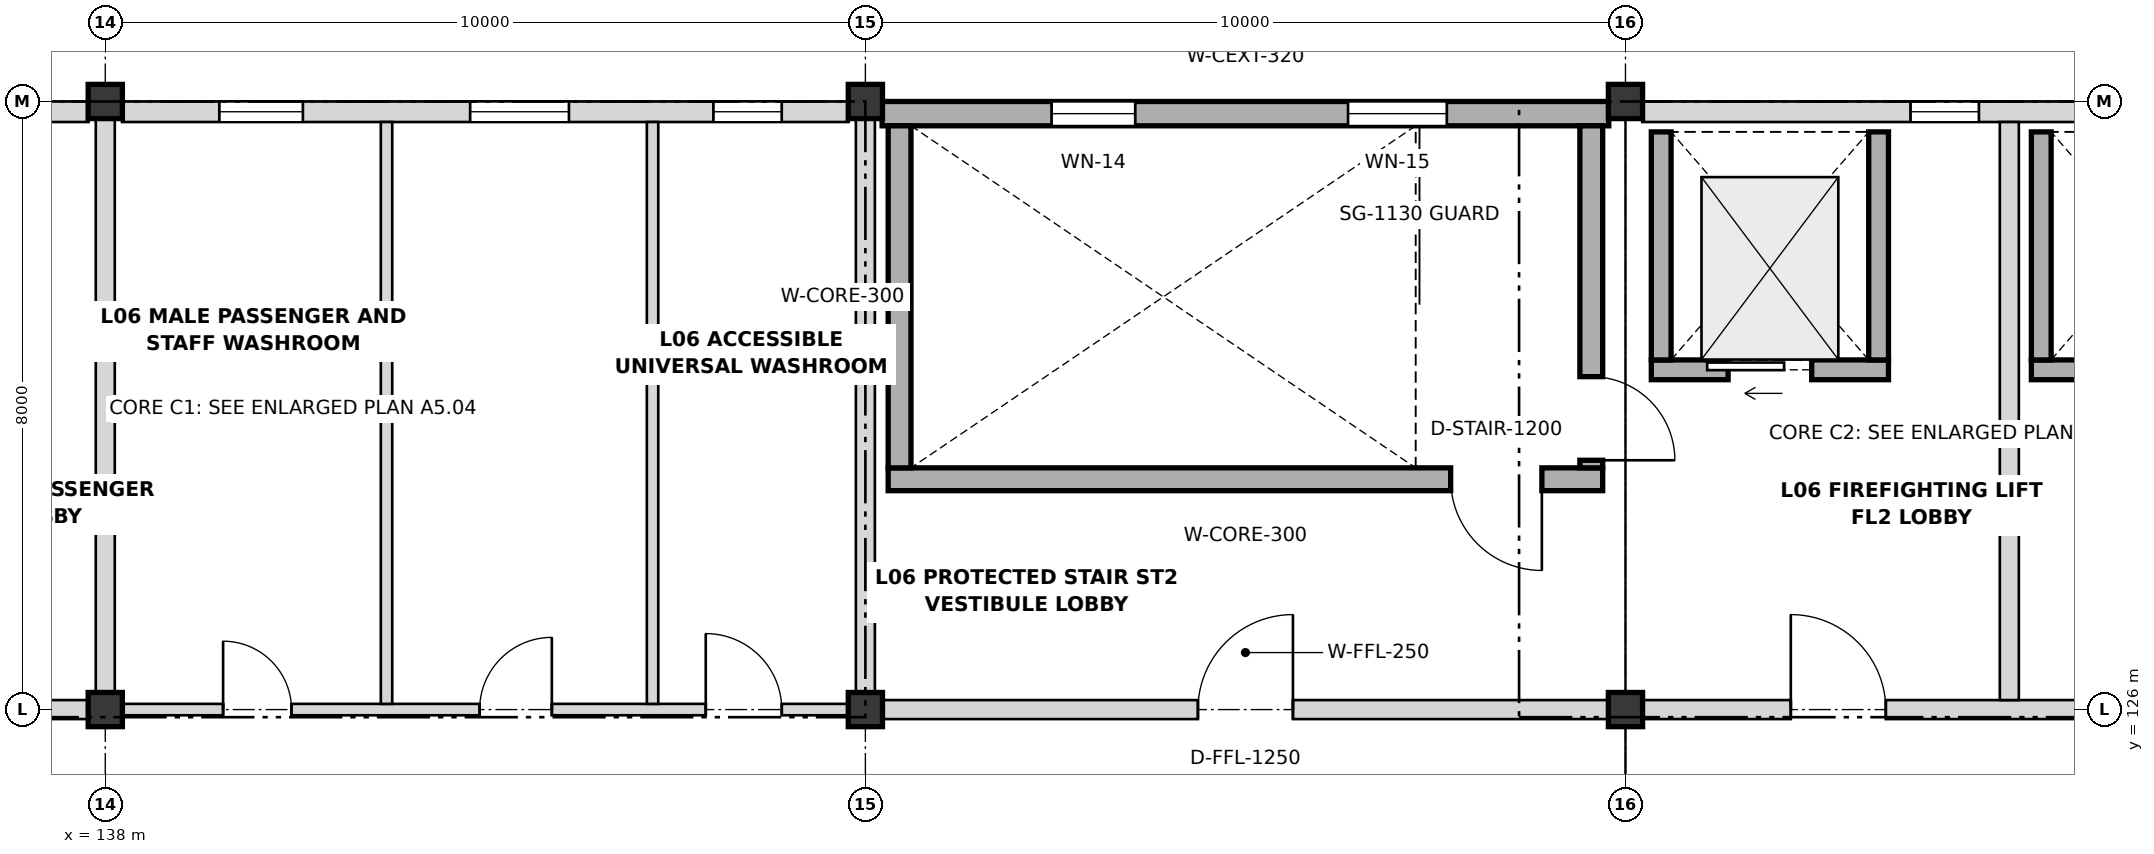
"""IFC4 building model, lengths in metres.
Left out: names, types, materials, properties, quantities, classifications, styles, units other than length and angle.
Written with IfcOpenShell. Run it as: python <this file> out.ifc"""

import sys

from ifc_helpers import new_model, si_unit, direction, frame, frame_2d, origin, origin_2d, place, context, subcontext, project, spatial, rectangle, extrude, element, fill, save


model = new_model("IFC4")
c1 = context("Model", 3, precision=1e-05, world=origin(), true_north=direction((0.0, 1.0)))
c2 = subcontext(c1, "Body", "Model", "MODEL_VIEW")
j1 = project(units=[si_unit("LENGTHUNIT", "METRE"), si_unit("PLANEANGLEUNIT", "RADIAN")], contexts=[c1])
p1 = place(None, origin())
s1 = spatial("IfcSite", under=j1, at=p1, CompositionType="ELEMENT")
p2 = place(p1, origin())
s2 = spatial("IfcBuilding", under=s1, at=p2, CompositionType="ELEMENT")
p3 = place(p2, frame((0.0, 0.0, 27.0)))
s3 = spatial("IfcBuildingStorey", under=s2, at=p3, CompositionType="ELEMENT", Elevation=27.0)
for number, where, z_axis, x_axis in (
    (1, (138.0, 126.0, 0.0), (0.0, 0.0, 1.0), (1.0, 0.0, 0.0)),
    (2, (138.0, 134.0, 0.0), (0.0, 0.0, 1.0), (1.0, 0.0, 0.0)),
    (3, (148.0, 126.0, 0.0), (0.0, 0.0, 1.0), (1.0, 0.0, 0.0)),
    (4, (148.0, 134.0, 0.0), (0.0, 0.0, 1.0), (1.0, 0.0, 0.0)),
    (5, (158.0, 126.0, 0.0), (0.0, 0.0, 1.0), (1.0, 0.0, 0.0)),
    (6, (158.0, 134.0, 0.0), (0.0, 0.0, 1.0), (1.0, 0.0, 0.0)),
):
    element("IfcColumn", number, at=place(p3, frame(where, z_axis=z_axis, x_axis=x_axis)), inside=s3, PredefinedType="COLUMN", context=c2, shape_type="SweptSolid", body=[
        extrude(rectangle(XDim=0.45, YDim=0.45, at=origin_2d()), origin(), (0.0, 0.0, 1.0), 4.2),
    ])
p4 = place(p3, frame((128.22, 133.865, 0.0), z_axis=(0.0, 0.0, 1.0), x_axis=(1.0, 0.0, 0.0)))
e7 = element("IfcWall", 7, at=p4, inside=s3, PredefinedType="SOLIDWALL", context=c2, shape_type="SweptSolid", body=[
    extrude(rectangle(XDim=9.56, YDim=0.27, at=frame_2d((4.78, 0.0))), origin(), (0.0, 0.0, 1.0), 3.218),
])
p5 = place(p4, frame((3.53, 0.0, 1.05)))
e8 = element("IfcOpeningElement", 8, at=p5, cuts=e7, PredefinedType="OPENING", context=c2, shape_type="SweptSolid", body=[
    extrude(rectangle(XDim=0.9, YDim=1.15, at=frame_2d((0.45, 0.575))), frame((0.0, 0.145, 0.0), z_axis=(0.0, -1.0, 0.0), x_axis=(1.0, 0.0, 0.0)), (0.0, 0.0, 1.0), 0.29),
])
p6 = place(p3, frame((138.22, 133.865, 0.0), z_axis=(0.0, 0.0, 1.0), x_axis=(1.0, 0.0, 0.0)))
e9 = element("IfcWall", 9, at=p6, inside=s3, PredefinedType="SOLIDWALL", context=c2, shape_type="SweptSolid", body=[
    extrude(rectangle(XDim=9.56, YDim=0.27, at=frame_2d((4.78, 0.0))), origin(), (0.0, 0.0, 1.0), 3.218),
])
p7 = place(p6, frame((1.28, 0.0, 1.25)))
e10 = element("IfcOpeningElement", 10, at=p7, cuts=e9, PredefinedType="OPENING", context=c2, shape_type="SweptSolid", body=[
    extrude(rectangle(XDim=1.1, YDim=1.15, at=frame_2d((0.55, 0.575))), frame((0.0, 0.145, 0.0), z_axis=(0.0, -1.0, 0.0), x_axis=(1.0, 0.0, 0.0)), (0.0, 0.0, 1.0), 0.29),
])
p8 = place(p6, frame((4.58, 0.0, 1.25)))
e11 = element("IfcOpeningElement", 11, at=p8, cuts=e9, PredefinedType="OPENING", context=c2, shape_type="SweptSolid", body=[
    extrude(rectangle(XDim=1.3, YDim=1.15, at=frame_2d((0.65, 0.575))), frame((0.0, 0.145, 0.0), z_axis=(0.0, -1.0, 0.0), x_axis=(1.0, 0.0, 0.0)), (0.0, 0.0, 1.0), 0.29),
])
p9 = place(p6, frame((7.78, 0.0, 1.25)))
e12 = element("IfcOpeningElement", 12, at=p9, cuts=e9, PredefinedType="OPENING", context=c2, shape_type="SweptSolid", body=[
    extrude(rectangle(XDim=0.9, YDim=1.4, at=frame_2d((0.45, 0.7))), frame((0.0, 0.145, 0.0), z_axis=(0.0, -1.0, 0.0), x_axis=(1.0, 0.0, 0.0)), (0.0, 0.0, 1.0), 0.29),
])
p10 = place(p3, frame((148.22, 133.84, 0.0), z_axis=(0.0, 0.0, 1.0), x_axis=(1.0, 0.0, 0.0)))
e13 = element("IfcWall", 13, at=p10, inside=s3, PredefinedType="SHEAR", context=c2, shape_type="SweptSolid", body=[
    extrude(rectangle(XDim=9.56, YDim=0.32, at=frame_2d((4.78, 0.0))), origin(), (0.0, 0.0, 1.0), 4.2),
])
p11 = place(p10, frame((2.23, 0.0, 1.05)))
e14 = element("IfcOpeningElement", 14, at=p11, cuts=e13, PredefinedType="OPENING", context=c2, shape_type="SweptSolid", body=[
    extrude(rectangle(XDim=1.1, YDim=1.4, at=frame_2d((0.55, 0.7))), frame((0.0, 0.17, 0.0), z_axis=(0.0, -1.0, 0.0), x_axis=(1.0, 0.0, 0.0)), (0.0, 0.0, 1.0), 0.34),
])
p12 = place(p10, frame((6.13, 0.0, 1.05)))
e15 = element("IfcOpeningElement", 15, at=p12, cuts=e13, PredefinedType="OPENING", context=c2, shape_type="SweptSolid", body=[
    extrude(rectangle(XDim=1.3, YDim=1.4, at=frame_2d((0.65, 0.7))), frame((0.0, 0.17, 0.0), z_axis=(0.0, -1.0, 0.0), x_axis=(1.0, 0.0, 0.0)), (0.0, 0.0, 1.0), 0.34),
])
p13 = place(p3, frame((158.22, 133.865, 0.0), z_axis=(0.0, 0.0, 1.0), x_axis=(1.0, 0.0, 0.0)))
e16 = element("IfcWall", 16, at=p13, inside=s3, PredefinedType="SOLIDWALL", context=c2, shape_type="SweptSolid", body=[
    extrude(rectangle(XDim=9.56, YDim=0.27, at=frame_2d((4.78, 0.0))), origin(), (0.0, 0.0, 1.0), 3.218),
])
p14 = place(p13, frame((3.53, 0.0, 1.05)))
e17 = element("IfcOpeningElement", 17, at=p14, cuts=e16, PredefinedType="OPENING", context=c2, shape_type="SweptSolid", body=[
    extrude(rectangle(XDim=0.9, YDim=1.15, at=frame_2d((0.45, 0.575))), frame((0.0, 0.145, 0.0), z_axis=(0.0, -1.0, 0.0), x_axis=(1.0, 0.0, 0.0)), (0.0, 0.0, 1.0), 0.29),
])
p15 = place(p3, frame((157.7, 129.03, 0.0), z_axis=(0.0, 0.0, 1.0), x_axis=(-1.0, 0.0, 0.0)))
e18 = element("IfcWall", 18, at=p15, inside=s3, PredefinedType="SHEAR", context=c2, shape_type="SweptSolid", body=[
    extrude(rectangle(XDim=9.4, YDim=0.3, at=frame_2d((4.7, 0.0))), origin(), (0.0, 0.0, 1.0), 3.98),
])
p16 = place(p15, frame((0.8, 0.0, 0.0)))
e19 = element("IfcOpeningElement", 19, at=p16, cuts=e18, PredefinedType="OPENING", context=c2, shape_type="SweptSolid", body=[
    extrude(rectangle(XDim=1.2, YDim=2.15, at=frame_2d((0.6, 1.075))), frame((0.0, 0.16, 0.0), z_axis=(0.0, -1.0, 0.0), x_axis=(1.0, 0.0, 0.0)), (0.0, 0.0, 1.0), 0.32),
])
p17 = place(p3, frame((157.55, 133.68, 0.0), z_axis=(0.0, 0.0, 1.0), x_axis=(0.0, -1.0, 0.0)))
e20 = element("IfcWall", 20, at=p17, inside=s3, PredefinedType="SHEAR", context=c2, shape_type="SweptSolid", body=[
    extrude(rectangle(XDim=4.5, YDim=0.3, at=frame_2d((2.25, 0.0))), origin(), (0.0, 0.0, 1.0), 3.98),
])
p18 = place(p17, frame((3.3, 0.0, 0.0)))
e21 = element("IfcOpeningElement", 21, at=p18, cuts=e20, PredefinedType="OPENING", context=c2, shape_type="SweptSolid", body=[
    extrude(rectangle(XDim=1.1, YDim=2.15, at=frame_2d((0.55, 1.075))), frame((0.0, 0.16, 0.0), z_axis=(0.0, -1.0, 0.0), x_axis=(1.0, 0.0, 0.0)), (0.0, 0.0, 1.0), 0.32),
])
p19 = place(p3, frame((148.45, 129.18, 0.0), z_axis=(0.0, 0.0, 1.0), x_axis=(0.0, 1.0, 0.0)))
e22 = element("IfcWall", 22, at=p19, inside=s3, PredefinedType="SHEAR", context=c2, shape_type="SweptSolid", body=[
    extrude(rectangle(XDim=4.5, YDim=0.3, at=frame_2d((2.25, 0.0))), origin(), (0.0, 0.0, 1.0), 3.98),
])
p20 = place(p3, frame((158.34, 130.47, 0.0), z_axis=(0.0, 0.0, 1.0), x_axis=(1.0, 0.0, 0.0)))
e23 = element("IfcWall", 23, at=p20, inside=s3, PredefinedType="SHEAR", context=c2, shape_type="SweptSolid", body=[
    extrude(rectangle(XDim=3.12, YDim=0.26, at=frame_2d((1.56, 0.0))), origin(), (0.0, 0.0, 1.0), 3.98),
])
p21 = place(p20, frame((1.01, 0.0, 0.0)))
e24 = element("IfcOpeningElement", 24, at=p21, cuts=e23, PredefinedType="OPENING", context=c2, shape_type="SweptSolid", body=[
    extrude(rectangle(XDim=1.1, YDim=2.1, at=frame_2d((0.55, 1.05))), frame((0.0, 0.14, 0.0), z_axis=(0.0, -1.0, 0.0), x_axis=(1.0, 0.0, 0.0)), (0.0, 0.0, 1.0), 0.28),
])
for number, where, z_axis, x_axis in (
    (25, (158.47, 130.6, 0.0), (0.0, 0.0, 1.0), (0.0, 1.0, 0.0)),
    (26, (161.33, 130.6, 0.0), (0.0, 0.0, 1.0), (0.0, 1.0, 0.0)),
):
    element("IfcWall", number, at=place(p3, frame(where, z_axis=z_axis, x_axis=x_axis)), inside=s3, PredefinedType="SHEAR", context=c2, shape_type="SweptSolid", body=[
        extrude(rectangle(XDim=3.0, YDim=0.26, at=frame_2d((1.5, 0.0))), origin(), (0.0, 0.0, 1.0), 3.98),
    ])
p22 = place(p3, frame((163.34, 130.47, 0.0), z_axis=(0.0, 0.0, 1.0), x_axis=(1.0, 0.0, 0.0)))
e27 = element("IfcWall", 27, at=p22, inside=s3, PredefinedType="SHEAR", context=c2, shape_type="SweptSolid", body=[
    extrude(rectangle(XDim=3.12, YDim=0.26, at=frame_2d((1.56, 0.0))), origin(), (0.0, 0.0, 1.0), 3.98),
])
p23 = place(p22, frame((1.01, 0.0, 0.0)))
e28 = element("IfcOpeningElement", 28, at=p23, cuts=e27, PredefinedType="OPENING", context=c2, shape_type="SweptSolid", body=[
    extrude(rectangle(XDim=1.1, YDim=2.15, at=frame_2d((0.55, 1.075))), frame((0.0, 0.14, 0.0), z_axis=(0.0, -1.0, 0.0), x_axis=(1.0, 0.0, 0.0)), (0.0, 0.0, 1.0), 0.28),
])
p24 = place(p3, frame((163.47, 130.6, 0.0), z_axis=(0.0, 0.0, 1.0), x_axis=(0.0, 1.0, 0.0)))
e29 = element("IfcWall", 29, at=p24, inside=s3, PredefinedType="SHEAR", context=c2, shape_type="SweptSolid", body=[
    extrude(rectangle(XDim=3.0, YDim=0.26, at=frame_2d((1.5, 0.0))), origin(), (0.0, 0.0, 1.0), 3.98),
])
p25 = place(p3, frame((128.23, 126.0, 0.0), z_axis=(0.0, 0.0, 1.0), x_axis=(1.0, 0.0, 0.0)))
e30 = element("IfcWall", 30, at=p25, inside=s3, PredefinedType="PARTITIONING", context=c2, shape_type="SweptSolid", body=[
    extrude(rectangle(XDim=9.54, YDim=0.25, at=frame_2d((4.77, 0.0))), origin(), (0.0, 0.0, 1.0), 3.218),
])
p26 = place(p25, frame((1.945, 0.0, 0.0)))
e31 = element("IfcOpeningElement", 31, at=p26, cuts=e30, PredefinedType="OPENING", context=c2, shape_type="SweptSolid", body=[
    extrude(rectangle(XDim=1.25, YDim=2.15, at=frame_2d((0.625, 1.075))), frame((0.0, 0.135, 0.0), z_axis=(0.0, -1.0, 0.0), x_axis=(1.0, 0.0, 0.0)), (0.0, 0.0, 1.0), 0.27),
])
p27 = place(p25, frame((6.42, 0.0, 0.0)))
e32 = element("IfcOpeningElement", 32, at=p27, cuts=e30, PredefinedType="OPENING", context=c2, shape_type="SweptSolid", body=[
    extrude(rectangle(XDim=1.1, YDim=2.15, at=frame_2d((0.55, 1.075))), frame((0.0, 0.135, 0.0), z_axis=(0.0, -1.0, 0.0), x_axis=(1.0, 0.0, 0.0)), (0.0, 0.0, 1.0), 0.27),
])
p28 = place(p3, frame((138.23, 126.0, 0.0), z_axis=(0.0, 0.0, 1.0), x_axis=(1.0, 0.0, 0.0)))
e33 = element("IfcWall", 33, at=p28, inside=s3, PredefinedType="PARTITIONING", context=c2, shape_type="SweptSolid", body=[
    extrude(rectangle(XDim=9.54, YDim=0.15, at=frame_2d((4.77, 0.0))), origin(), (0.0, 0.0, 1.0), 3.218),
])
p29 = place(p28, frame((1.32, 0.0, 0.0)))
e34 = element("IfcOpeningElement", 34, at=p29, cuts=e33, PredefinedType="OPENING", context=c2, shape_type="SweptSolid", body=[
    extrude(rectangle(XDim=0.9, YDim=2.05, at=frame_2d((0.45, 1.025))), frame((0.0, 0.085, 0.0), z_axis=(0.0, -1.0, 0.0), x_axis=(1.0, 0.0, 0.0)), (0.0, 0.0, 1.0), 0.17),
])
p30 = place(p28, frame((4.695, 0.0, 0.0)))
e35 = element("IfcOpeningElement", 35, at=p30, cuts=e33, PredefinedType="OPENING", context=c2, shape_type="SweptSolid", body=[
    extrude(rectangle(XDim=0.95, YDim=2.05, at=frame_2d((0.475, 1.025))), frame((0.0, 0.085, 0.0), z_axis=(0.0, -1.0, 0.0), x_axis=(1.0, 0.0, 0.0)), (0.0, 0.0, 1.0), 0.17),
])
p31 = place(p28, frame((7.67, 0.0, 0.0)))
e36 = element("IfcOpeningElement", 36, at=p31, cuts=e33, PredefinedType="OPENING", context=c2, shape_type="SweptSolid", body=[
    extrude(rectangle(XDim=1.0, YDim=2.05, at=frame_2d((0.5, 1.025))), frame((0.0, 0.085, 0.0), z_axis=(0.0, -1.0, 0.0), x_axis=(1.0, 0.0, 0.0)), (0.0, 0.0, 1.0), 0.17),
])
p32 = place(p3, frame((148.23, 126.0, 0.0), z_axis=(0.0, 0.0, 1.0), x_axis=(1.0, 0.0, 0.0)))
e37 = element("IfcWall", 37, at=p32, inside=s3, PredefinedType="PARTITIONING", context=c2, shape_type="SweptSolid", body=[
    extrude(rectangle(XDim=9.54, YDim=0.25, at=frame_2d((4.77, 0.0))), origin(), (0.0, 0.0, 1.0), 3.218),
])
p33 = place(p32, frame((4.145, 0.0, 0.0)))
e38 = element("IfcOpeningElement", 38, at=p33, cuts=e37, PredefinedType="OPENING", context=c2, shape_type="SweptSolid", body=[
    extrude(rectangle(XDim=1.25, YDim=2.15, at=frame_2d((0.625, 1.075))), frame((0.0, 0.135, 0.0), z_axis=(0.0, -1.0, 0.0), x_axis=(1.0, 0.0, 0.0)), (0.0, 0.0, 1.0), 0.27),
])
p34 = place(p3, frame((158.23, 126.0, 0.0), z_axis=(0.0, 0.0, 1.0), x_axis=(1.0, 0.0, 0.0)))
e39 = element("IfcWall", 39, at=p34, inside=s3, PredefinedType="PARTITIONING", context=c2, shape_type="SweptSolid", body=[
    extrude(rectangle(XDim=9.54, YDim=0.25, at=frame_2d((4.77, 0.0))), origin(), (0.0, 0.0, 1.0), 3.218),
])
p35 = place(p34, frame((1.945, 0.0, 0.0)))
e40 = element("IfcOpeningElement", 40, at=p35, cuts=e39, PredefinedType="OPENING", context=c2, shape_type="SweptSolid", body=[
    extrude(rectangle(XDim=1.25, YDim=2.15, at=frame_2d((0.625, 1.075))), frame((0.0, 0.135, 0.0), z_axis=(0.0, -1.0, 0.0), x_axis=(1.0, 0.0, 0.0)), (0.0, 0.0, 1.0), 0.27),
])
p36 = place(p34, frame((6.42, 0.0, 0.0)))
e41 = element("IfcOpeningElement", 41, at=p36, cuts=e39, PredefinedType="OPENING", context=c2, shape_type="SweptSolid", body=[
    extrude(rectangle(XDim=1.1, YDim=2.15, at=frame_2d((0.55, 1.075))), frame((0.0, 0.135, 0.0), z_axis=(0.0, -1.0, 0.0), x_axis=(1.0, 0.0, 0.0)), (0.0, 0.0, 1.0), 0.27),
])
p37 = place(p3, frame((163.05, 126.125, 0.0), z_axis=(0.0, 0.0, 1.0), x_axis=(0.0, 1.0, 0.0)))
e42 = element("IfcWall", 42, at=p37, inside=s3, PredefinedType="PARTITIONING", context=c2, shape_type="SweptSolid", body=[
    extrude(rectangle(XDim=7.605, YDim=0.25, at=frame_2d((3.802, 0.0))), origin(), (0.0, 0.0, 1.0), 3.218),
])
for number, where, z_axis, x_axis in (
    (43, (141.7, 126.075, 0.0), (0.0, 0.0, 1.0), (0.0, 1.0, 0.0)),
    (44, (145.2, 126.075, 0.0), (0.0, 0.0, 1.0), (0.0, 1.0, 0.0)),
):
    element("IfcWall", number, at=place(p3, frame(where, z_axis=z_axis, x_axis=x_axis)), inside=s3, PredefinedType="PARTITIONING", context=c2, shape_type="SweptSolid", body=[
        extrude(rectangle(XDim=7.655, YDim=0.15, at=frame_2d((3.828, 0.0))), origin(), (0.0, 0.0, 1.0), 3.218),
    ])
for number, where, z_axis, x_axis in (
    (45, (138.0, 126.23, 0.0), (0.0, 0.0, 1.0), (0.0, 1.0, 0.0)),
    (46, (148.0, 126.23, 0.0), (0.0, 0.0, 1.0), (0.0, 1.0, 0.0)),
):
    element("IfcWall", number, at=place(p3, frame(where, z_axis=z_axis, x_axis=x_axis)), inside=s3, PredefinedType="PARTITIONING", context=c2, shape_type="SweptSolid", body=[
        extrude(rectangle(XDim=7.54, YDim=0.25, at=frame_2d((3.77, 0.0))), origin(), (0.0, 0.0, 1.0), 3.218),
    ])
p38 = place(p7, origin())
e47 = element("IfcWindow", 47, at=p38, inside=s3, PartitioningType="SINGLE_PANEL", PredefinedType="WINDOW", context=c2, shape_type="SweptSolid", body=[
    extrude(rectangle(XDim=1.1, YDim=1.15, at=frame_2d((0.55, 0.575))), frame((0.0, 0.03, 0.0), z_axis=(0.0, -1.0, 0.0), x_axis=(1.0, 0.0, 0.0)), (0.0, 0.0, 1.0), 0.06),
])
fill(e10, e47)
p39 = place(p8, origin())
e48 = element("IfcWindow", 48, at=p39, inside=s3, PartitioningType="SINGLE_PANEL", PredefinedType="WINDOW", context=c2, shape_type="SweptSolid", body=[
    extrude(rectangle(XDim=1.3, YDim=1.15, at=frame_2d((0.65, 0.575))), frame((0.0, 0.03, 0.0), z_axis=(0.0, -1.0, 0.0), x_axis=(1.0, 0.0, 0.0)), (0.0, 0.0, 1.0), 0.06),
])
fill(e11, e48)
p40 = place(p9, origin())
e49 = element("IfcWindow", 49, at=p40, inside=s3, PartitioningType="SINGLE_PANEL", PredefinedType="WINDOW", context=c2, shape_type="SweptSolid", body=[
    extrude(rectangle(XDim=0.9, YDim=1.4, at=frame_2d((0.45, 0.7))), frame((0.0, 0.03, 0.0), z_axis=(0.0, -1.0, 0.0), x_axis=(1.0, 0.0, 0.0)), (0.0, 0.0, 1.0), 0.06),
])
fill(e12, e49)
p41 = place(p11, origin())
e50 = element("IfcWindow", 50, at=p41, inside=s3, PartitioningType="SINGLE_PANEL", PredefinedType="WINDOW", context=c2, shape_type="SweptSolid", body=[
    extrude(rectangle(XDim=1.1, YDim=1.4, at=frame_2d((0.55, 0.7))), frame((0.0, 0.03, 0.0), z_axis=(0.0, -1.0, 0.0), x_axis=(1.0, 0.0, 0.0)), (0.0, 0.0, 1.0), 0.06),
])
fill(e14, e50)
p42 = place(p12, origin())
e51 = element("IfcWindow", 51, at=p42, inside=s3, PartitioningType="SINGLE_PANEL", PredefinedType="WINDOW", context=c2, shape_type="SweptSolid", body=[
    extrude(rectangle(XDim=1.3, YDim=1.4, at=frame_2d((0.65, 0.7))), frame((0.0, 0.03, 0.0), z_axis=(0.0, -1.0, 0.0), x_axis=(1.0, 0.0, 0.0)), (0.0, 0.0, 1.0), 0.06),
])
fill(e15, e51)
p43 = place(p14, origin())
e52 = element("IfcWindow", 52, at=p43, inside=s3, PartitioningType="SINGLE_PANEL", PredefinedType="WINDOW", context=c2, shape_type="SweptSolid", body=[
    extrude(rectangle(XDim=0.9, YDim=1.15, at=frame_2d((0.45, 0.575))), frame((0.0, 0.03, 0.0), z_axis=(0.0, -1.0, 0.0), x_axis=(1.0, 0.0, 0.0)), (0.0, 0.0, 1.0), 0.06),
])
fill(e17, e52)
p44 = place(p16, origin())
e53 = element("IfcDoor", 53, at=p44, inside=s3, OperationType="SINGLE_SWING_LEFT", PredefinedType="DOOR", context=c2, shape_type="SweptSolid", body=[
    extrude(rectangle(XDim=1.2, YDim=2.15, at=frame_2d((0.6, 1.075))), frame((0.0, 0.025, 0.0), z_axis=(0.0, -1.0, 0.0), x_axis=(1.0, 0.0, 0.0)), (0.0, 0.0, 1.0), 0.05),
])
fill(e19, e53)
p45 = place(p18, origin())
e54 = element("IfcDoor", 54, at=p45, inside=s3, OperationType="SINGLE_SWING_RIGHT", PredefinedType="DOOR", context=c2, shape_type="SweptSolid", body=[
    extrude(rectangle(XDim=1.1, YDim=2.15, at=frame_2d((0.55, 1.075))), frame((0.0, 0.025, 0.0), z_axis=(0.0, -1.0, 0.0), x_axis=(1.0, 0.0, 0.0)), (0.0, 0.0, 1.0), 0.05),
])
fill(e21, e54)
p46 = place(p21, origin())
e55 = element("IfcDoor", 55, at=p46, inside=s3, OperationType="SLIDING_TO_LEFT", PredefinedType="DOOR", context=c2, shape_type="SweptSolid", body=[
    extrude(rectangle(XDim=1.1, YDim=2.1, at=frame_2d((0.55, 1.05))), frame((0.0, 0.025, 0.0), z_axis=(0.0, -1.0, 0.0), x_axis=(1.0, 0.0, 0.0)), (0.0, 0.0, 1.0), 0.05),
])
fill(e24, e55)
p47 = place(p29, origin())
e56 = element("IfcDoor", 56, at=p47, inside=s3, OperationType="SINGLE_SWING_LEFT", PredefinedType="DOOR", context=c2, shape_type="SweptSolid", body=[
    extrude(rectangle(XDim=0.9, YDim=2.05, at=frame_2d((0.45, 1.025))), frame((0.0, 0.025, 0.0), z_axis=(0.0, -1.0, 0.0), x_axis=(1.0, 0.0, 0.0)), (0.0, 0.0, 1.0), 0.05),
])
fill(e34, e56)
p48 = place(p30, origin())
e57 = element("IfcDoor", 57, at=p48, inside=s3, OperationType="SINGLE_SWING_RIGHT", PredefinedType="DOOR", context=c2, shape_type="SweptSolid", body=[
    extrude(rectangle(XDim=0.95, YDim=2.05, at=frame_2d((0.475, 1.025))), frame((0.0, 0.025, 0.0), z_axis=(0.0, -1.0, 0.0), x_axis=(1.0, 0.0, 0.0)), (0.0, 0.0, 1.0), 0.05),
])
fill(e35, e57)
p49 = place(p31, origin())
e58 = element("IfcDoor", 58, at=p49, inside=s3, OperationType="SINGLE_SWING_LEFT", PredefinedType="DOOR", context=c2, shape_type="SweptSolid", body=[
    extrude(rectangle(XDim=1.0, YDim=2.05, at=frame_2d((0.5, 1.025))), frame((0.0, 0.025, 0.0), z_axis=(0.0, -1.0, 0.0), x_axis=(1.0, 0.0, 0.0)), (0.0, 0.0, 1.0), 0.05),
])
fill(e36, e58)
p50 = place(p33, origin())
e59 = element("IfcDoor", 59, at=p50, inside=s3, OperationType="SINGLE_SWING_RIGHT", PredefinedType="DOOR", context=c2, shape_type="SweptSolid", body=[
    extrude(rectangle(XDim=1.25, YDim=2.15, at=frame_2d((0.625, 1.075))), frame((0.0, 0.025, 0.0), z_axis=(0.0, -1.0, 0.0), x_axis=(1.0, 0.0, 0.0)), (0.0, 0.0, 1.0), 0.05),
])
fill(e38, e59)
p51 = place(p35, origin())
e60 = element("IfcDoor", 60, at=p51, inside=s3, OperationType="SINGLE_SWING_LEFT", PredefinedType="DOOR", context=c2, shape_type="SweptSolid", body=[
    extrude(rectangle(XDim=1.25, YDim=2.15, at=frame_2d((0.625, 1.075))), frame((0.0, 0.025, 0.0), z_axis=(0.0, -1.0, 0.0), x_axis=(1.0, 0.0, 0.0)), (0.0, 0.0, 1.0), 0.05),
])
fill(e40, e60)
save(model, sys.argv[1])
